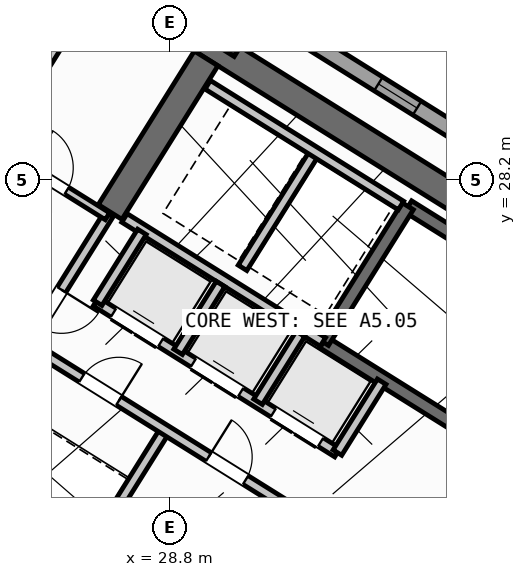
"""IFC4 building model, lengths in metres.
Left out: names, types, materials, properties, quantities, classifications, styles, units other than length and angle.
Written with IfcOpenShell. Run it as: python <this file> out.ifc"""

import sys

from ifc_helpers import new_model, si_unit, direction, frame, frame_2d, origin, origin_2d, place, context, subcontext, project, spatial, rectangle, hollow_rectangle, extrude, source, transform, mapped, element, fill, save


model = new_model("IFC4")
c1 = context("Model", 3, precision=1e-05, world=origin(), true_north=direction((0.0, 1.0)))
c2 = subcontext(c1, "Body", "Model", "MODEL_VIEW")
j1 = project(units=[si_unit("LENGTHUNIT", "METRE"), si_unit("PLANEANGLEUNIT", "RADIAN")], contexts=[c1])
p1 = place(None, origin())
s1 = spatial("IfcSite", under=j1, at=p1, CompositionType="ELEMENT")
p2 = place(p1, origin())
s2 = spatial("IfcBuilding", under=s1, at=p2, CompositionType="ELEMENT")
p3 = place(p2, frame((0.0, 0.0, 162.3)))
s3 = spatial("IfcBuildingStorey", under=s2, at=p3, CompositionType="ELEMENT", Elevation=162.3)
p4 = place(p3, frame((40.573, 24.01, 0.0), z_axis=(0.0, 0.0, 1.0), x_axis=(-0.848047359947, 0.529920442413, 0.0)))
e1 = element("IfcWall", 1, at=p4, inside=s3, PredefinedType="SHEAR", context=c2, shape_type="SweptSolid", body=[
    extrude(rectangle(XDim=13.14, YDim=0.55, at=frame_2d((6.57, 0.0))), origin(), (0.0, 0.0, 1.0), 3.35),
])
p5 = place(p3, frame((29.517, 30.594, 0.0), z_axis=(0.0, 0.0, 1.0), x_axis=(-0.529906864564, -0.848055844204, 0.0)))
e2 = element("IfcWall", 2, at=p5, inside=s3, PredefinedType="SHEAR", context=c2, shape_type="SweptSolid", body=[
    extrude(rectangle(XDim=3.575, YDim=0.55, at=frame_2d((1.788, 0.0))), origin(), (0.0, 0.0, 1.0), 3.35),
])
m1 = source(origin(), c2, "Body", "SweptSolid", [
    extrude(hollow_rectangle(XDim=0.9, YDim=0.9, WallThickness=0.036, at=origin_2d()), origin(), (0.0, 0.0, 1.0), 3.6),
])
p6 = place(p3, frame((29.928, 31.251, 0.0), z_axis=(0.0, 0.0, 1.0), x_axis=(-0.848048096156, 0.529919264233, 0.0)))
e3 = element("IfcColumn", 3, at=p6, inside=s3, PredefinedType="COLUMN", context=c2, shape_type="MappedRepresentation", body=[
    mapped(m1, transform((0.0, 0.0, 0.0), scale=1.0)),
])
p7 = place(p3, frame((29.268, 6.429, 0.0), z_axis=(0.0, 0.0, 1.0), x_axis=(-0.848049971435, 0.529916263149, 0.0)))
e4 = element("IfcWall", 4, at=p7, inside=s3, PredefinedType="STANDARD", context=c2, shape_type="SweptSolid", body=[
    extrude(rectangle(XDim=31.588, YDim=0.32, at=frame_2d((15.794, 0.0))), origin(), (0.0, 0.0, 1.0), 3.35),
])
p8 = place(p7, frame((16.362, 0.0, 0.0)))
e5 = element("IfcOpeningElement", 5, at=p8, cuts=e4, PredefinedType="OPENING", context=c2, shape_type="SweptSolid", body=[
    extrude(rectangle(XDim=1.2, YDim=2.15, at=frame_2d((0.6, 1.075))), frame((0.0, 0.17, 0.0), z_axis=(0.0, -1.0, 0.0), x_axis=(1.0, 0.0, 0.0)), (0.0, 0.0, 1.0), 0.34),
])
p9 = place(p7, frame((2.989, 0.0, 0.8)))
e6 = element("IfcOpeningElement", 6, at=p9, cuts=e4, PredefinedType="OPENING", context=c2, shape_type="SweptSolid", body=[
    extrude(rectangle(XDim=2.1, YDim=1.55, at=frame_2d((1.05, 0.775))), frame((0.0, 0.17, 0.0), z_axis=(0.0, -1.0, 0.0), x_axis=(1.0, 0.0, 0.0)), (0.0, 0.0, 1.0), 0.34),
])
p10 = place(p7, frame((8.359, 0.0, 0.8)))
e7 = element("IfcOpeningElement", 7, at=p10, cuts=e4, PredefinedType="OPENING", context=c2, shape_type="SweptSolid", body=[
    extrude(rectangle(XDim=2.1, YDim=1.55, at=frame_2d((1.05, 0.775))), frame((0.0, 0.17, 0.0), z_axis=(0.0, -1.0, 0.0), x_axis=(1.0, 0.0, 0.0)), (0.0, 0.0, 1.0), 0.34),
])
p11 = place(p7, frame((13.284, 0.0, 0.95)))
e8 = element("IfcOpeningElement", 8, at=p11, cuts=e4, PredefinedType="OPENING", context=c2, shape_type="SweptSolid", body=[
    extrude(rectangle(XDim=1.2, YDim=1.4, at=frame_2d((0.6, 0.7))), frame((0.0, 0.17, 0.0), z_axis=(0.0, -1.0, 0.0), x_axis=(1.0, 0.0, 0.0)), (0.0, 0.0, 1.0), 0.34),
])
p12 = place(p7, frame((20.39, 0.0, 0.95)))
e9 = element("IfcOpeningElement", 9, at=p12, cuts=e4, PredefinedType="OPENING", context=c2, shape_type="SweptSolid", body=[
    extrude(rectangle(XDim=1.2, YDim=1.4, at=frame_2d((0.6, 0.7))), frame((0.0, 0.17, 0.0), z_axis=(0.0, -1.0, 0.0), x_axis=(1.0, 0.0, 0.0)), (0.0, 0.0, 1.0), 0.34),
])
p13 = place(p7, frame((23.715, 0.0, 1.0)))
e10 = element("IfcOpeningElement", 10, at=p13, cuts=e4, PredefinedType="OPENING", context=c2, shape_type="SweptSolid", body=[
    extrude(rectangle(XDim=0.9, YDim=1.25, at=frame_2d((0.45, 0.625))), frame((0.0, 0.17, 0.0), z_axis=(0.0, -1.0, 0.0), x_axis=(1.0, 0.0, 0.0)), (0.0, 0.0, 1.0), 0.34),
])
p14 = place(p7, frame((26.106, 0.0, 0.85)))
e11 = element("IfcOpeningElement", 11, at=p14, cuts=e4, PredefinedType="OPENING", context=c2, shape_type="SweptSolid", body=[
    extrude(rectangle(XDim=1.5, YDim=1.5, at=frame_2d((0.75, 0.75))), frame((0.0, 0.17, 0.0), z_axis=(0.0, -1.0, 0.0), x_axis=(1.0, 0.0, 0.0)), (0.0, 0.0, 1.0), 0.34),
])
p15 = place(p7, frame((29.068, 0.0, 0.85)))
e12 = element("IfcOpeningElement", 12, at=p15, cuts=e4, PredefinedType="OPENING", context=c2, shape_type="SweptSolid", body=[
    extrude(rectangle(XDim=1.8, YDim=1.5, at=frame_2d((0.9, 0.75))), frame((0.0, 0.17, 0.0), z_axis=(0.0, -1.0, 0.0), x_axis=(1.0, 0.0, 0.0)), (0.0, 0.0, 1.0), 0.34),
])
p16 = place(p3, frame((14.138, 41.825, 0.0), z_axis=(0.0, 0.0, 1.0), x_axis=(0.848046498049, -0.529921821731, 0.0)))
e13 = element("IfcWall", 13, at=p16, inside=s3, PredefinedType="STANDARD", context=c2, shape_type="SweptSolid", body=[
    extrude(rectangle(XDim=31.588, YDim=0.32, at=frame_2d((15.794, 0.0))), origin(), (0.0, 0.0, 1.0), 3.35),
])
p17 = place(p16, frame((3.253, 0.0, 0.0)))
e14 = element("IfcOpeningElement", 14, at=p17, cuts=e13, PredefinedType="OPENING", context=c2, shape_type="SweptSolid", body=[
    extrude(rectangle(XDim=1.05, YDim=2.15, at=frame_2d((0.525, 1.075))), frame((0.0, 0.17, 0.0), z_axis=(0.0, -1.0, 0.0), x_axis=(1.0, 0.0, 0.0)), (0.0, 0.0, 1.0), 0.34),
])
p18 = place(p16, frame((0.863, 0.0, 0.85)))
e15 = element("IfcOpeningElement", 15, at=p18, cuts=e13, PredefinedType="OPENING", context=c2, shape_type="SweptSolid", body=[
    extrude(rectangle(XDim=1.8, YDim=1.5, at=frame_2d((0.9, 0.75))), frame((0.0, 0.17, 0.0), z_axis=(0.0, -1.0, 0.0), x_axis=(1.0, 0.0, 0.0)), (0.0, 0.0, 1.0), 0.34),
])
p19 = place(p16, frame((8.494, 0.0, 0.85)))
e16 = element("IfcOpeningElement", 16, at=p19, cuts=e13, PredefinedType="OPENING", context=c2, shape_type="SweptSolid", body=[
    extrude(rectangle(XDim=1.8, YDim=1.5, at=frame_2d((0.9, 0.75))), frame((0.0, 0.17, 0.0), z_axis=(0.0, -1.0, 0.0), x_axis=(1.0, 0.0, 0.0)), (0.0, 0.0, 1.0), 0.34),
])
p20 = place(p16, frame((13.874, 0.0, 0.85)))
e17 = element("IfcOpeningElement", 17, at=p20, cuts=e13, PredefinedType="OPENING", context=c2, shape_type="SweptSolid", body=[
    extrude(rectangle(XDim=1.5, YDim=1.5, at=frame_2d((0.75, 0.75))), frame((0.0, 0.17, 0.0), z_axis=(0.0, -1.0, 0.0), x_axis=(1.0, 0.0, 0.0)), (0.0, 0.0, 1.0), 0.34),
])
p21 = place(p16, frame((17.104, 0.0, 1.0)))
e18 = element("IfcOpeningElement", 18, at=p21, cuts=e13, PredefinedType="OPENING", context=c2, shape_type="SweptSolid", body=[
    extrude(rectangle(XDim=0.9, YDim=1.25, at=frame_2d((0.45, 0.625))), frame((0.0, 0.17, 0.0), z_axis=(0.0, -1.0, 0.0), x_axis=(1.0, 0.0, 0.0)), (0.0, 0.0, 1.0), 0.34),
])
p22 = place(p16, frame((22.144, 0.0, 1.0)))
e19 = element("IfcOpeningElement", 19, at=p22, cuts=e13, PredefinedType="OPENING", context=c2, shape_type="SweptSolid", body=[
    extrude(rectangle(XDim=0.9, YDim=1.25, at=frame_2d((0.45, 0.625))), frame((0.0, 0.17, 0.0), z_axis=(0.0, -1.0, 0.0), x_axis=(1.0, 0.0, 0.0)), (0.0, 0.0, 1.0), 0.34),
])
p23 = place(p16, frame((27.744, 0.0, 1.0)))
e20 = element("IfcOpeningElement", 20, at=p23, cuts=e13, PredefinedType="OPENING", context=c2, shape_type="SweptSolid", body=[
    extrude(rectangle(XDim=0.9, YDim=1.25, at=frame_2d((0.45, 0.625))), frame((0.0, 0.17, 0.0), z_axis=(0.0, -1.0, 0.0), x_axis=(1.0, 0.0, 0.0)), (0.0, 0.0, 1.0), 0.34),
])
p24 = place(p3, frame((31.28, 18.261, 0.0), z_axis=(0.0, 0.0, 1.0), x_axis=(-0.848051618787, 0.529913626805, 0.0)))
e21 = element("IfcWall", 21, at=p24, inside=s3, PredefinedType="SHEAR", context=c2, shape_type="SweptSolid", body=[
    extrude(rectangle(XDim=7.46, YDim=0.26, at=frame_2d((3.73, 0.0))), origin(), (0.0, 0.0, 1.0), 3.35),
])
p25 = place(p24, frame((0.36, 0.0, 0.0)))
e22 = element("IfcOpeningElement", 22, at=p25, cuts=e21, PredefinedType="OPENING", context=c2, shape_type="SweptSolid", body=[
    extrude(rectangle(XDim=0.86, YDim=2.05, at=frame_2d((0.43, 1.025))), frame((0.0, 0.14, 0.0), z_axis=(0.0, -1.0, 0.0), x_axis=(1.0, 0.0, 0.0)), (0.0, 0.0, 1.0), 0.28),
])
p26 = place(p3, frame((39.721, 23.788, 0.0), z_axis=(0.0, 0.0, 1.0), x_axis=(-0.848054434086, 0.529909121291, 0.0)))
e23 = element("IfcWall", 23, at=p26, inside=s3, PredefinedType="SHEAR", context=c2, shape_type="SweptSolid", body=[
    extrude(rectangle(XDim=7.33, YDim=0.26, at=frame_2d((3.665, 0.0))), origin(), (0.0, 0.0, 1.0), 3.35),
])
p27 = place(p3, frame((38.046, 21.108, 0.0), z_axis=(0.0, 0.0, 1.0), x_axis=(-0.848054434086, 0.529909121291, 0.0)))
e24 = element("IfcWall", 24, at=p27, inside=s3, PredefinedType="SHEAR", context=c2, shape_type="SweptSolid", body=[
    extrude(rectangle(XDim=7.33, YDim=0.26, at=frame_2d((3.665, 0.0))), origin(), (0.0, 0.0, 1.0), 3.35),
])
p28 = place(p27, frame((0.22, 0.0, 0.0)))
e25 = element("IfcOpeningElement", 25, at=p28, cuts=e24, PredefinedType="OPENING", context=c2, shape_type="SweptSolid", body=[
    extrude(rectangle(XDim=1.1, YDim=2.1, at=frame_2d((0.55, 1.05))), frame((0.0, 0.14, 0.0), z_axis=(0.0, -1.0, 0.0), x_axis=(1.0, 0.0, 0.0)), (0.0, 0.0, 1.0), 0.28),
])
p29 = place(p3, frame((33.496, 27.677, 0.0), z_axis=(0.0, 0.0, 1.0), x_axis=(-0.529908658664, -0.84805472316, 0.0)))
e26 = element("IfcWall", 26, at=p29, inside=s3, PredefinedType="SHEAR", context=c2, shape_type="SweptSolid", body=[
    extrude(rectangle(XDim=3.16, YDim=0.26, at=frame_2d((1.58, 0.0))), origin(), (0.0, 0.0, 1.0), 3.35),
])
p30 = place(p3, frame((31.822, 24.998, 0.0), z_axis=(0.0, 0.0, 1.0), x_axis=(-0.848036912365, 0.52993716162, 0.0)))
e27 = element("IfcWall", 27, at=p30, inside=s3, PredefinedType="STANDARD", context=c2, shape_type="SweptSolid", body=[
    extrude(rectangle(XDim=4.618, YDim=0.2, at=frame_2d((2.309, 0.0))), origin(), (0.0, 0.0, 1.0), 3.34),
])
p31 = place(p3, frame((32.108, 22.814, 0.0), z_axis=(0.0, 0.0, 1.0), x_axis=(-0.848042229521, 0.529928652696, 0.0)))
e28 = element("IfcWall", 28, at=p31, inside=s3, PredefinedType="STANDARD", context=c2, shape_type="SweptSolid", body=[
    extrude(rectangle(XDim=5.62, YDim=0.2, at=frame_2d((2.81, 0.0))), origin(), (0.0, 0.0, 1.0), 3.34),
])
p32 = place(p31, frame((0.39, 0.0, 0.0)))
e29 = element("IfcOpeningElement", 29, at=p32, cuts=e28, PredefinedType="OPENING", context=c2, shape_type="SweptSolid", body=[
    extrude(rectangle(XDim=1.1, YDim=2.15, at=frame_2d((0.55, 1.075))), frame((0.0, 0.11, 0.0), z_axis=(0.0, -1.0, 0.0), x_axis=(1.0, 0.0, 0.0)), (0.0, 0.0, 1.0), 0.22),
])
p33 = place(p31, frame((2.25, 0.0, 0.0)))
e30 = element("IfcOpeningElement", 30, at=p33, cuts=e28, PredefinedType="OPENING", context=c2, shape_type="SweptSolid", body=[
    extrude(rectangle(XDim=1.1, YDim=2.15, at=frame_2d((0.55, 1.075))), frame((0.0, 0.11, 0.0), z_axis=(0.0, -1.0, 0.0), x_axis=(1.0, 0.0, 0.0)), (0.0, 0.0, 1.0), 0.22),
])
p34 = place(p31, frame((4.11, 0.0, 0.0)))
e31 = element("IfcOpeningElement", 31, at=p34, cuts=e28, PredefinedType="OPENING", context=c2, shape_type="SweptSolid", body=[
    extrude(rectangle(XDim=1.1, YDim=2.15, at=frame_2d((0.55, 1.075))), frame((0.0, 0.11, 0.0), z_axis=(0.0, -1.0, 0.0), x_axis=(1.0, 0.0, 0.0)), (0.0, 0.0, 1.0), 0.22),
])
p35 = place(p3, frame((32.982, 24.213, 0.0), z_axis=(0.0, 0.0, 1.0), x_axis=(-0.529839334948, -0.84809803628, 0.0)))
e32 = element("IfcWall", 32, at=p35, inside=s3, PredefinedType="STANDARD", context=c2, shape_type="SweptSolid", body=[
    extrude(rectangle(XDim=1.65, YDim=0.2, at=frame_2d((0.825, 0.0))), origin(), (0.0, 0.0, 1.0), 3.34),
])
p36 = place(p3, frame((28.25, 27.17, 0.0), z_axis=(0.0, 0.0, 1.0), x_axis=(-0.529905827651, -0.848056492117, 0.0)))
e33 = element("IfcWall", 33, at=p36, inside=s3, PredefinedType="STANDARD", context=c2, shape_type="SweptSolid", body=[
    extrude(rectangle(XDim=1.65, YDim=0.2, at=frame_2d((0.825, 0.0))), origin(), (0.0, 0.0, 1.0), 3.34),
])
p37 = place(p3, frame((31.645, 28.716, 0.0), z_axis=(0.0, 0.0, 1.0), x_axis=(-0.52986693015, -0.848080795876, 0.0)))
e34 = element("IfcWall", 34, at=p37, inside=s3, PredefinedType="STANDARD", context=c2, shape_type="SweptSolid", body=[
    extrude(rectangle(XDim=2.66, YDim=0.2, at=frame_2d((1.33, 0.0))), origin(), (0.0, 0.0, 1.0), 3.34),
])
p38 = place(p3, frame((33.363, 27.69, 0.0), z_axis=(0.0, 0.0, 1.0), x_axis=(-0.848047090064, 0.529920874315, 0.0)))
e35 = element("IfcWall", 35, at=p38, inside=s3, PredefinedType="STANDARD", context=c2, shape_type="SweptSolid", body=[
    extrude(rectangle(XDim=4.498, YDim=0.2, at=frame_2d((2.249, 0.0))), origin(), (0.0, 0.0, 1.0), 3.34),
])
for number, where, z_axis, x_axis in (
    (36, (31.379, 25.156, 0.0), (0.0, 0.0, 1.0), (-0.53, -0.848, 0.0)),
    (37, (29.801, 26.142, 0.0), (0.0, 0.0, 1.0), (-0.53, -0.848, 0.0)),
):
    element("IfcWall", number, at=place(p3, frame(where, z_axis=z_axis, x_axis=x_axis)), inside=s3, PredefinedType="STANDARD", context=c2, shape_type="SweptSolid", body=[
        extrude(rectangle(XDim=1.58, YDim=0.2, at=frame_2d((0.79, 0.0))), origin(), (0.0, 0.0, 1.0), 3.34),
    ])
p39 = place(p3, frame((28.71, 23.263, 0.0), z_axis=(0.0, 0.0, 1.0), x_axis=(-0.529907497854, -0.848055448493, 0.0)))
e38 = element("IfcWall", 38, at=p39, inside=s3, PredefinedType="STANDARD", context=c2, shape_type="SweptSolid", body=[
    extrude(rectangle(XDim=2.88, YDim=0.2, at=frame_2d((1.44, 0.0))), origin(), (0.0, 0.0, 1.0), 3.34),
])
p40 = place(p3, frame((31.525, 21.504, 0.0), z_axis=(0.0, 0.0, 1.0), x_axis=(-0.848040211232, 0.529931882541, 0.0)))
e39 = element("IfcWall", 39, at=p40, inside=s3, PredefinedType="STANDARD", context=c2, shape_type="SweptSolid", body=[
    extrude(rectangle(XDim=6.218, YDim=0.2, at=frame_2d((3.109, 0.0))), origin(), (0.0, 0.0, 1.0), 3.34),
])
p41 = place(p40, frame((4.4, 0.0, 0.0)))
e40 = element("IfcOpeningElement", 40, at=p41, cuts=e39, PredefinedType="OPENING", context=c2, shape_type="SweptSolid", body=[
    extrude(rectangle(XDim=0.86, YDim=2.05, at=frame_2d((0.43, 1.025))), frame((0.0, 0.11, 0.0), z_axis=(0.0, -1.0, 0.0), x_axis=(1.0, 0.0, 0.0)), (0.0, 0.0, 1.0), 0.22),
])
p42 = place(p40, frame((1.45, 0.0, 0.0)))
e41 = element("IfcOpeningElement", 41, at=p42, cuts=e39, PredefinedType="OPENING", context=c2, shape_type="SweptSolid", body=[
    extrude(rectangle(XDim=0.86, YDim=2.05, at=frame_2d((0.43, 1.025))), frame((0.0, 0.11, 0.0), z_axis=(0.0, -1.0, 0.0), x_axis=(1.0, 0.0, 0.0)), (0.0, 0.0, 1.0), 0.22),
])
p43 = place(p3, frame((27.596, 27.52, 0.0), z_axis=(0.0, 0.0, 1.0), x_axis=(-0.529865479138, -0.848081702443, 0.0)))
e42 = element("IfcWall", 42, at=p43, inside=s3, PredefinedType="STANDARD", context=c2, shape_type="SweptSolid", body=[
    extrude(rectangle(XDim=2.96, YDim=0.2, at=frame_2d((1.48, 0.0))), origin(), (0.0, 0.0, 1.0), 3.34),
])
p44 = place(p43, frame((1.76, 0.0, 0.0)))
e43 = element("IfcOpeningElement", 43, at=p44, cuts=e42, PredefinedType="OPENING", context=c2, shape_type="SweptSolid", body=[
    extrude(rectangle(XDim=0.86, YDim=2.05, at=frame_2d((0.43, 1.025))), frame((0.0, 0.11, 0.0), z_axis=(0.0, -1.0, 0.0), x_axis=(1.0, 0.0, 0.0)), (0.0, 0.0, 1.0), 0.22),
])
p45 = place(p3, frame((27.57, 27.478, 0.0), z_axis=(0.0, 0.0, 1.0), x_axis=(-0.848050851465, 0.529914854792, 0.0)))
e44 = element("IfcWall", 44, at=p45, inside=s3, PredefinedType="PARTITIONING", context=c2, shape_type="SweptSolid", body=[
    extrude(rectangle(XDim=2.61, YDim=0.16, at=frame_2d((1.305, 0.0))), origin(), (0.0, 0.0, 1.0), 3.34),
])
p46 = place(p45, frame((0.95, 0.0, 0.0)))
e45 = element("IfcOpeningElement", 45, at=p46, cuts=e44, PredefinedType="OPENING", context=c2, shape_type="SweptSolid", body=[
    extrude(rectangle(XDim=0.86, YDim=2.05, at=frame_2d((0.43, 1.025))), frame((0.0, 0.09, 0.0), z_axis=(0.0, -1.0, 0.0), x_axis=(1.0, 0.0, 0.0)), (0.0, 0.0, 1.0), 0.18),
])
p47 = place(p3, frame((27.953, 33.016, 0.0), z_axis=(0.0, 0.0, 1.0), x_axis=(-0.529906322364, -0.848056182997, 0.0)))
e46 = element("IfcWall", 46, at=p47, inside=s3, PredefinedType="PARTITIONING", context=c2, shape_type="SweptSolid", body=[
    extrude(rectangle(XDim=5.45, YDim=0.16, at=frame_2d((2.725, 0.0))), origin(), (0.0, 0.0, 1.0), 3.34),
])
m2 = source(origin(), c2, "Body", "SweptSolid", [
    extrude(rectangle(XDim=0.9, YDim=1.25, at=frame_2d((0.45, 0.625))), frame((0.0, 0.03, 0.0), z_axis=(0.0, -1.0, 0.0), x_axis=(1.0, 0.0, 0.0)), (0.0, 0.0, 1.0), 0.06),
])
p48 = place(p22, origin())
e47 = element("IfcWindow", 47, at=p48, inside=s3, PartitioningType="SINGLE_PANEL", PredefinedType="WINDOW", context=c2, shape_type="MappedRepresentation", body=[
    mapped(m2, transform((0.0, 0.0, 0.0), scale=1.0)),
])
fill(e19, e47)
m3 = source(origin(), c2, "Body", "SweptSolid", [
    extrude(rectangle(XDim=1.1, YDim=2.15, at=frame_2d((0.55, 1.075))), frame((0.0, 0.025, 0.0), z_axis=(0.0, -1.0, 0.0), x_axis=(1.0, 0.0, 0.0)), (0.0, 0.0, 1.0), 0.05),
])
p49 = place(p32, origin())
e48 = element("IfcDoor", 48, at=p49, inside=s3, OperationType="DOUBLE_DOOR_SLIDING", PredefinedType="DOOR", context=c2, shape_type="MappedRepresentation", body=[
    mapped(m3, transform((0.0, 0.0, 0.0), scale=1.0)),
])
fill(e29, e48)
p50 = place(p33, origin())
e49 = element("IfcDoor", 49, at=p50, inside=s3, OperationType="DOUBLE_DOOR_SLIDING", PredefinedType="DOOR", context=c2, shape_type="MappedRepresentation", body=[
    mapped(m3, transform((0.0, 0.0, 0.0), scale=1.0)),
])
fill(e30, e49)
p51 = place(p34, origin())
e50 = element("IfcDoor", 50, at=p51, inside=s3, OperationType="DOUBLE_DOOR_SLIDING", PredefinedType="DOOR", context=c2, shape_type="MappedRepresentation", body=[
    mapped(m3, transform((0.0, 0.0, 0.0), scale=1.0)),
])
fill(e31, e50)
m4 = source(origin(), c2, "Body", "SweptSolid", [
    extrude(rectangle(XDim=0.86, YDim=2.05, at=frame_2d((0.43, 1.025))), frame((0.0, 0.025, 0.0), z_axis=(0.0, -1.0, 0.0), x_axis=(1.0, 0.0, 0.0)), (0.0, 0.0, 1.0), 0.05),
])
p52 = place(p41, frame((0.86, 0.0, 0.0), z_axis=(0.0, 0.0, 1.0), x_axis=(-1.0, 0.0, 0.0)))
e51 = element("IfcDoor", 51, at=p52, inside=s3, OperationType="SINGLE_SWING_RIGHT", PredefinedType="DOOR", context=c2, shape_type="MappedRepresentation", body=[
    mapped(m4, transform((0.0, 0.0, 0.0), scale=1.0)),
])
fill(e40, e51)
p53 = place(p42, frame((0.86, 0.0, 0.0), z_axis=(0.0, 0.0, 1.0), x_axis=(-1.0, 0.0, 0.0)))
e52 = element("IfcDoor", 52, at=p53, inside=s3, OperationType="SINGLE_SWING_LEFT", PredefinedType="DOOR", context=c2, shape_type="MappedRepresentation", body=[
    mapped(m4, transform((0.0, 0.0, 0.0), scale=1.0)),
])
fill(e41, e52)
p54 = place(p46, frame((0.86, 0.0, 0.0), z_axis=(0.0, 0.0, 1.0), x_axis=(-1.0, 0.0, 0.0)))
e53 = element("IfcDoor", 53, at=p54, inside=s3, OperationType="SINGLE_SWING_LEFT", PredefinedType="DOOR", context=c2, shape_type="MappedRepresentation", body=[
    mapped(m4, transform((0.0, 0.0, 0.0), scale=1.0)),
])
fill(e45, e53)
p55 = place(p44, origin())
e54 = element("IfcDoor", 54, at=p55, inside=s3, OperationType="SINGLE_SWING_LEFT", PredefinedType="DOOR", context=c2, shape_type="MappedRepresentation", body=[
    mapped(m4, transform((0.0, 0.0, 0.0), scale=1.0)),
])
fill(e43, e54)
save(model, sys.argv[1])
